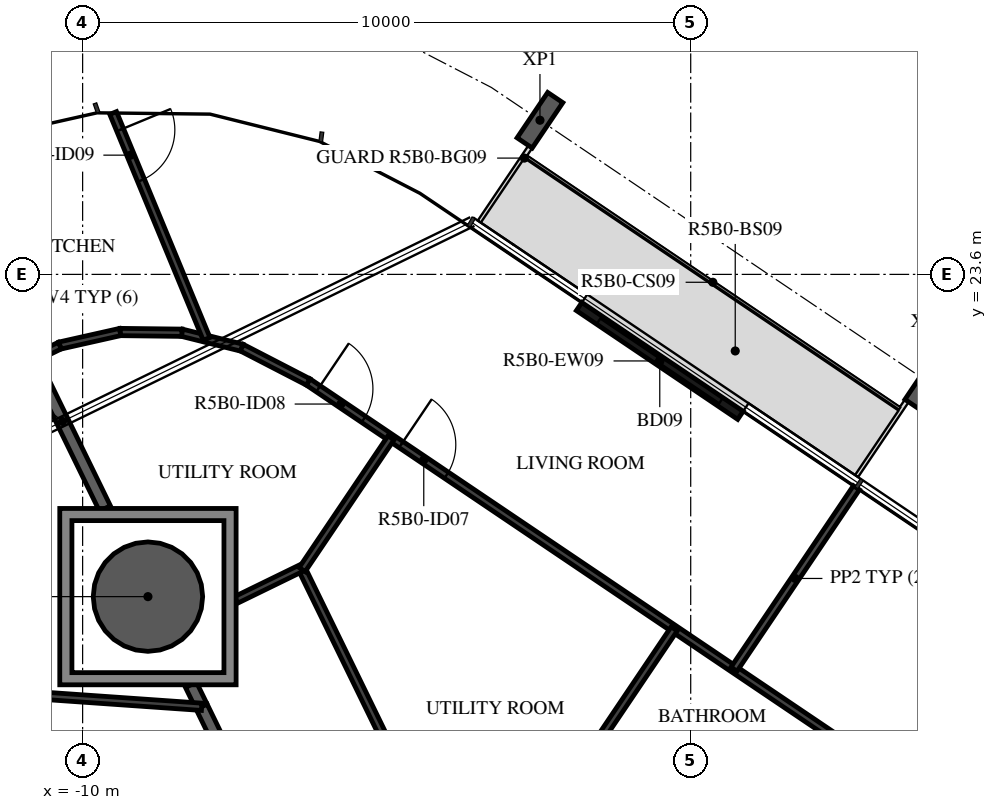
"""IFC4 building model, lengths in metres.
Left out: names, types, materials, properties, quantities, classifications, styles, units other than length and angle.
Written with IfcOpenShell. Run it as: python <this file> out.ifc"""

import sys

from ifc_helpers import new_model, si_unit, direction, frame, frame_2d, origin, origin_2d, place, context, subcontext, project, spatial, polyline, rectangle, hollow_circle, i_section, outline, extrude, element, fill, save


model = new_model("IFC4")
c1 = context("Model", 3, precision=1e-05, world=origin(), true_north=direction((0.0, 1.0)))
c2 = subcontext(c1, "Body", "Model", "MODEL_VIEW")
j1 = project(units=[si_unit("LENGTHUNIT", "METRE"), si_unit("PLANEANGLEUNIT", "RADIAN")], contexts=[c1])
p1 = place(None, origin())
s1 = spatial("IfcSite", under=j1, at=p1, CompositionType="ELEMENT")
p2 = place(p1, origin())
s2 = spatial("IfcBuilding", under=s1, at=p2, CompositionType="ELEMENT")
p3 = place(p2, frame((0.0, 0.0, 202.4)))
s3 = spatial("IfcBuildingStorey", under=s2, at=p3, CompositionType="ELEMENT", Elevation=202.4)
p4 = place(p3, frame((-8.926, 18.301, -0.38), z_axis=(0.0, 0.0, 1.0), x_axis=(1.0, 0.0, 0.0)))
e1 = element("IfcColumn", 1, at=p4, inside=s3, PredefinedType="COLUMN", context=c2, shape_type="SweptSolid", body=[
    extrude(hollow_circle(Radius=0.9, WallThickness=0.04, at=origin_2d()), origin(), (0.0, 0.0, 1.0), 3.5),
])
for number, where, z_axis, x_axis in (
    (2, (3.899, 21.833, -0.38), (0.0, 0.0, 1.0), (0.829, -0.559, 0.0)),
    (3, (-2.479, 26.135, -0.38), (0.0, 0.0, 1.0), (0.829, -0.559, 0.0)),
):
    element("IfcColumn", number, at=place(p3, frame(where, z_axis=z_axis, x_axis=x_axis)), inside=s3, PredefinedType="COLUMN", context=c2, shape_type="SweptSolid", body=[
        extrude(i_section(OverallWidth=0.3, OverallDepth=0.9, WebThickness=0.019, FlangeThickness=0.035, FilletRadius=0.03, at=origin_2d()), origin(), (0.0, 0.0, 1.0), 3.5),
    ])
p5 = place(p3, frame((0.818, 21.282, 0.0), z_axis=(0.0, 0.0, 1.0), x_axis=(-0.829044984211, 0.559181915082, 0.0)))
e4 = element("IfcWall", 4, at=p5, inside=s3, PredefinedType="STANDARD", context=c2, shape_type="SweptSolid", body=[
    extrude(rectangle(XDim=3.2, YDim=0.16, at=frame_2d((1.6, 0.0))), origin(), (0.0, 0.0, 1.0), 3.12),
])
p6 = place(p5, frame((0.4, 0.0, 0.0)))
e5 = element("IfcOpeningElement", 5, at=p6, cuts=e4, PredefinedType="OPENING", context=c2, shape_type="SweptSolid", body=[
    extrude(rectangle(XDim=2.4, YDim=2.4, at=frame_2d((1.2, 1.2))), frame((0.0, 0.09, 0.0), z_axis=(0.0, -1.0, 0.0), x_axis=(1.0, 0.0, 0.0)), (0.0, 0.0, 1.0), 0.18),
])
p7 = place(p3, frame((-8.042, 16.489, 0.0), z_axis=(0.0, 0.0, 1.0), x_axis=(0.438345825707, -0.898806395774, 0.0)))
e6 = element("IfcWall", 6, at=p7, inside=s3, PredefinedType="STANDARD", context=c2, shape_type="SweptSolid", body=[
    extrude(rectangle(XDim=4.946, YDim=0.2, at=frame_2d((2.473, 0.0))), origin(), (0.0, 0.0, 1.0), 3.12),
])
p8 = place(p3, frame((-8.219, 16.851, 0.0), z_axis=(0.0, 0.0, 1.0), x_axis=(0.438281645094, -0.898837693676, 0.0)))
e7 = element("IfcWall", 7, at=p8, inside=s3, PredefinedType="STANDARD", context=c2, shape_type="SweptSolid", body=[
    extrude(rectangle(XDim=0.373, YDim=0.2, at=frame_2d((0.186, 0.0))), origin(), (0.0, 0.0, 1.0), 3.12),
])
p9 = place(p3, frame((-12.409, 25.442, 0.0), z_axis=(0.0, 0.0, 1.0), x_axis=(0.43838641251, -0.898786600549, 0.0)))
e8 = element("IfcWall", 8, at=p9, inside=s3, PredefinedType="STANDARD", context=c2, shape_type="SweptSolid", body=[
    extrude(rectangle(XDim=6.333, YDim=0.2, at=frame_2d((3.166, 0.0))), origin(), (0.0, 0.0, 1.0), 3.12),
])
p10 = place(p3, frame((-4.308, 14.477, 0.0), z_axis=(0.0, 0.0, 1.0), x_axis=(-0.43837096777, 0.898794133613, 0.0)))
e9 = element("IfcWall", 9, at=p10, inside=s3, PredefinedType="PARTITIONING", context=c2, shape_type="SweptSolid", body=[
    extrude(rectangle(XDim=4.75, YDim=0.12, at=frame_2d((2.375, 0.0))), origin(), (0.0, 0.0, 1.0), 3.12),
])
p11 = place(p3, frame((-6.402, 18.771, 0.0), z_axis=(0.0, 0.0, 1.0), x_axis=(-0.898797905192, -0.438363234797, 0.0)))
e10 = element("IfcWall", 10, at=p11, inside=s3, PredefinedType="PARTITIONING", context=c2, shape_type="SweptSolid", body=[
    extrude(rectangle(XDim=1.195, YDim=0.12, at=frame_2d((0.597, 0.0))), origin(), (0.0, 0.0, 1.0), 3.12),
])
p12 = place(p3, frame((-6.292, 21.831, 0.0), z_axis=(0.0, 0.0, 1.0), x_axis=(0.829040041754, -0.559189242715, 0.0)))
e11 = element("IfcWall", 11, at=p12, inside=s3, PredefinedType="PARTITIONING", context=c2, shape_type="SweptSolid", body=[
    extrude(rectangle(XDim=12.879, YDim=0.12, at=frame_2d((6.439, 0.0))), origin(), (0.0, 0.0, 1.0), 3.12),
])
p13 = place(p12, frame((1.844, 0.0, 0.0)))
e12 = element("IfcOpeningElement", 12, at=p13, cuts=e11, PredefinedType="OPENING", context=c2, shape_type="SweptSolid", body=[
    extrude(rectangle(XDim=0.9, YDim=2.1, at=frame_2d((0.45, 1.05))), frame((0.0, 0.07, 0.0), z_axis=(0.0, -1.0, 0.0), x_axis=(1.0, 0.0, 0.0)), (0.0, 0.0, 1.0), 0.14),
])
p14 = place(p12, frame((0.2, 0.0, 0.0)))
e13 = element("IfcOpeningElement", 13, at=p14, cuts=e11, PredefinedType="OPENING", context=c2, shape_type="SweptSolid", body=[
    extrude(rectangle(XDim=0.9, YDim=2.1, at=frame_2d((0.45, 1.05))), frame((0.0, 0.07, 0.0), z_axis=(0.0, -1.0, 0.0), x_axis=(1.0, 0.0, 0.0)), (0.0, 0.0, 1.0), 0.14),
])
p15 = place(p3, frame((2.725, 20.092, 0.0), z_axis=(0.0, 0.0, 1.0), x_axis=(-0.559230560117, -0.829012171582, 0.0)))
e14 = element("IfcWall", 14, at=p15, inside=s3, PredefinedType="PARTITIONING", context=c2, shape_type="SweptSolid", body=[
    extrude(rectangle(XDim=3.6, YDim=0.12, at=frame_2d((1.8, 0.0))), origin(), (0.0, 0.0, 1.0), 2.73),
])
p16 = place(p3, frame((-0.272, 17.771, 0.0), z_axis=(0.0, 0.0, 1.0), x_axis=(-0.559174158254, -0.829050216055, 0.0)))
e15 = element("IfcWall", 15, at=p16, inside=s3, PredefinedType="PARTITIONING", context=c2, shape_type="SweptSolid", body=[
    extrude(rectangle(XDim=3.243, YDim=0.12, at=frame_2d((1.622, 0.0))), origin(), (0.0, 0.0, 1.0), 3.12),
])
p17 = place(p3, frame((-8.367, 22.64, 0.0), z_axis=(0.0, 0.0, 1.0), x_axis=(0.970340073087, -0.241743960754, 0.0)))
e16 = element("IfcWall", 16, at=p17, inside=s3, PredefinedType="PARTITIONING", context=c2, shape_type="SweptSolid", body=[
    extrude(rectangle(XDim=1.016, YDim=0.12, at=frame_2d((0.508, 0.0))), origin(), (0.0, 0.0, 1.0), 3.12),
])
p18 = place(p3, frame((-7.382, 22.395, 0.0), z_axis=(0.0, 0.0, 1.0), x_axis=(0.888296031948, -0.459271335514, 0.0)))
e17 = element("IfcWall", 17, at=p18, inside=s3, PredefinedType="PARTITIONING", context=c2, shape_type="SweptSolid", body=[
    extrude(rectangle(XDim=1.227, YDim=0.12, at=frame_2d((0.613, 0.0))), origin(), (0.0, 0.0, 1.0), 3.12),
])
p19 = place(p3, frame((-9.498, 26.254, 0.0), z_axis=(0.0, 0.0, 1.0), x_axis=(0.38230709116, -0.924035328355, 0.0)))
e18 = element("IfcWall", 18, at=p19, inside=s3, PredefinedType="PARTITIONING", context=c2, shape_type="SweptSolid", body=[
    extrude(rectangle(XDim=4.02, YDim=0.12, at=frame_2d((2.01, 0.0))), origin(), (0.0, 0.0, 1.0), 3.12),
])
p20 = place(p19, frame((0.3, 0.0, 0.0)))
e19 = element("IfcOpeningElement", 19, at=p20, cuts=e18, PredefinedType="OPENING", context=c2, shape_type="SweptSolid", body=[
    extrude(rectangle(XDim=0.9, YDim=2.1, at=frame_2d((0.45, 1.05))), frame((0.0, 0.07, 0.0), z_axis=(0.0, -1.0, 0.0), x_axis=(1.0, 0.0, 0.0)), (0.0, 0.0, 1.0), 0.14),
])
p21 = place(p3, frame((-4.929, 20.912, 0.0), z_axis=(0.0, 0.0, 1.0), x_axis=(-0.559155109057, -0.829063063955, 0.0)))
e20 = element("IfcWall", 20, at=p21, inside=s3, PredefinedType="PARTITIONING", context=c2, shape_type="SweptSolid", body=[
    extrude(rectangle(XDim=2.613, YDim=0.12, at=frame_2d((1.307, 0.0))), origin(), (0.0, 0.0, 1.0), 3.12),
])
for number, where, z_axis, x_axis in (
    (21, (-8.367, 22.64, 0.0), (0.0, 0.0, 1.0), (-1.0, 0.012, 0.0)),
    (22, (-9.383, 22.652, 0.0), (0.0, 0.0, 1.0), (-0.976, -0.219, 0.0)),
):
    element("IfcWall", number, at=place(p3, frame(where, z_axis=z_axis, x_axis=x_axis)), inside=s3, PredefinedType="PARTITIONING", context=c2, shape_type="SweptSolid", body=[
        extrude(rectangle(XDim=1.016, YDim=0.12, at=frame_2d((0.508, 0.0))), origin(), (0.0, 0.0, 1.0), 3.12),
    ])
p22 = place(p3, frame((-10.375, 22.43, 0.0), z_axis=(0.0, 0.0, 1.0), x_axis=(-0.898710701911, -0.438541986895, 0.0)))
e23 = element("IfcWall", 23, at=p22, inside=s3, PredefinedType="PARTITIONING", context=c2, shape_type="SweptSolid", body=[
    extrude(rectangle(XDim=1.016, YDim=0.12, at=frame_2d((0.508, 0.0))), origin(), (0.0, 0.0, 1.0), 3.12),
])
p23 = place(p3, frame((-13.437, 16.866, 0.0), z_axis=(0.0, 0.0, 1.0), x_axis=(0.997564592961, -0.06974871232, 0.0)))
e24 = element("IfcWall", 24, at=p23, inside=s3, PredefinedType="PARTITIONING", context=c2, shape_type="SweptSolid", body=[
    extrude(rectangle(XDim=5.408, YDim=0.12, at=frame_2d((2.704, 0.0))), origin(), (0.0, 0.0, 1.0), 3.12),
])
p24 = place(p23, frame((0.2, 0.0, 0.0)))
e25 = element("IfcOpeningElement", 25, at=p24, cuts=e24, PredefinedType="OPENING", context=c2, shape_type="SweptSolid", body=[
    extrude(rectangle(XDim=0.9, YDim=2.1, at=frame_2d((0.45, 1.05))), frame((0.0, 0.07, 0.0), z_axis=(0.0, -1.0, 0.0), x_axis=(1.0, 0.0, 0.0)), (0.0, 0.0, 1.0), 0.14),
])
p25 = place(p3, origin())
e26 = element("IfcWall", 26, at=p25, inside=s3, PredefinedType="STANDARD", context=c2, shape_type="SweptSolid", body=[
    extrude(outline(polyline([(-7.476, 19.751), (-7.476, 16.851), (-10.376, 16.851), (-10.376, 19.751), (-7.476, 19.751)]), holes=[polyline([(-10.176, 17.051), (-7.676, 17.051), (-7.676, 19.551), (-10.176, 19.551), (-10.176, 17.051)])]), origin(), (0.0, 0.0, 1.0), 3.12),
])
p26 = place(p6, origin())
e27 = element("IfcDoor", 27, at=p26, inside=s3, OperationType="DOUBLE_DOOR_SLIDING", PredefinedType="DOOR", context=c2, shape_type="SweptSolid", body=[
    extrude(rectangle(XDim=2.4, YDim=2.4, at=frame_2d((1.2, 1.2))), frame((0.0, 0.025, 0.0), z_axis=(0.0, -1.0, 0.0), x_axis=(1.0, 0.0, 0.0)), (0.0, 0.0, 1.0), 0.05),
])
fill(e5, e27)
p27 = place(p13, origin())
e28 = element("IfcDoor", 28, at=p27, inside=s3, OperationType="SINGLE_SWING_RIGHT", PredefinedType="DOOR", context=c2, shape_type="SweptSolid", body=[
    extrude(rectangle(XDim=0.9, YDim=2.1, at=frame_2d((0.45, 1.05))), frame((0.0, 0.025, 0.0), z_axis=(0.0, -1.0, 0.0), x_axis=(1.0, 0.0, 0.0)), (0.0, 0.0, 1.0), 0.05),
])
fill(e12, e28)
p28 = place(p14, origin())
e29 = element("IfcDoor", 29, at=p28, inside=s3, OperationType="SINGLE_SWING_LEFT", PredefinedType="DOOR", context=c2, shape_type="SweptSolid", body=[
    extrude(rectangle(XDim=0.9, YDim=2.1, at=frame_2d((0.45, 1.05))), frame((0.0, 0.025, 0.0), z_axis=(0.0, -1.0, 0.0), x_axis=(1.0, 0.0, 0.0)), (0.0, 0.0, 1.0), 0.05),
])
fill(e13, e29)
p29 = place(p20, origin())
e30 = element("IfcDoor", 30, at=p29, inside=s3, OperationType="SINGLE_SWING_RIGHT", PredefinedType="DOOR", context=c2, shape_type="SweptSolid", body=[
    extrude(rectangle(XDim=0.9, YDim=2.1, at=frame_2d((0.45, 1.05))), frame((0.0, 0.025, 0.0), z_axis=(0.0, -1.0, 0.0), x_axis=(1.0, 0.0, 0.0)), (0.0, 0.0, 1.0), 0.05),
])
fill(e19, e30)
save(model, sys.argv[1])
